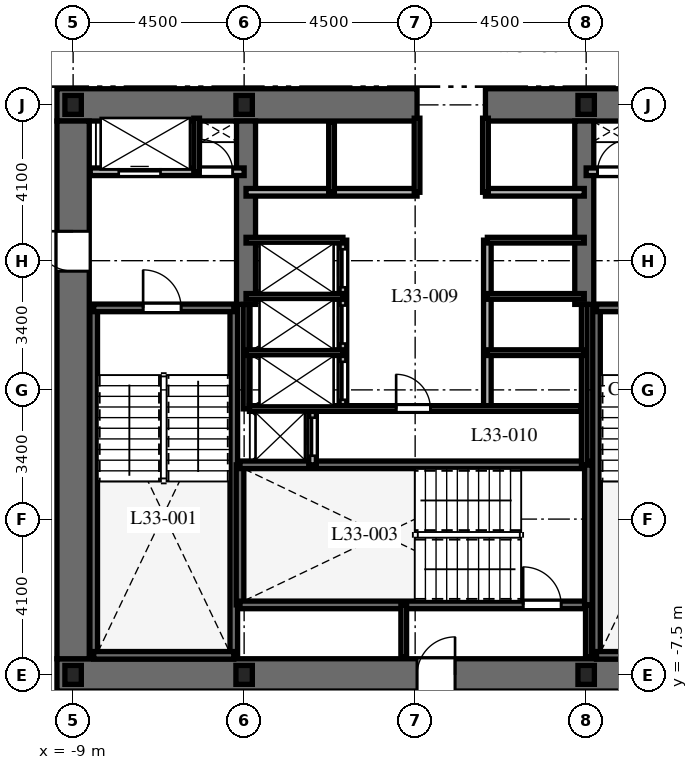
"""IFC4 building model, lengths in metres.
Left out: names, types, materials, properties, quantities, classifications, styles, units other than length and angle.
Written with IfcOpenShell. Run it as: python <this file> out.ifc"""

import sys

from ifc_helpers import new_model, si_unit, direction, frame, frame_2d, origin, origin_2d, place, context, subcontext, project, spatial, rectangle, i_section, extrude, element, fill, save


model = new_model("IFC4")
c1 = context("Model", 3, precision=1e-05, world=origin(), true_north=direction((0.0, 1.0)))
c2 = subcontext(c1, "Body", "Model", "MODEL_VIEW")
j1 = project(units=[si_unit("LENGTHUNIT", "METRE"), si_unit("PLANEANGLEUNIT", "RADIAN")], contexts=[c1])
p1 = place(None, origin())
s1 = spatial("IfcSite", under=j1, at=p1, CompositionType="ELEMENT")
p2 = place(p1, origin())
s2 = spatial("IfcBuilding", under=s1, at=p2, CompositionType="ELEMENT")
p3 = place(p2, frame((0.0, 0.0, 135.8)))
s3 = spatial("IfcBuildingStorey", under=s2, at=p3, CompositionType="ELEMENT", Elevation=135.8)
p4 = place(p3, frame((-9.425, -7.5, 0.0), z_axis=(0.0, 0.0, 1.0), x_axis=(1.0, 0.0, 0.0)))
e1 = element("IfcWall", 1, at=p4, inside=s3, PredefinedType="SHEAR", context=c2, shape_type="SweptSolid", body=[
    extrude(rectangle(XDim=18.85, YDim=0.85, at=frame_2d((9.425, 0.0))), origin(), (0.0, 0.0, 1.0), 3.7),
])
p5 = place(p4, frame((9.475, 0.0, 0.0)))
e2 = element("IfcOpeningElement", 2, at=p5, cuts=e1, PredefinedType="OPENING", context=c2, shape_type="SweptSolid", body=[
    extrude(rectangle(XDim=1.0, YDim=2.15, at=frame_2d((0.5, 1.075))), frame((0.0, 0.435, 0.0), z_axis=(0.0, -1.0, 0.0), x_axis=(1.0, 0.0, 0.0)), (0.0, 0.0, 1.0), 0.87),
])
p6 = place(p3, frame((-9.425, 7.5, 0.0), z_axis=(0.0, 0.0, 1.0), x_axis=(1.0, 0.0, 0.0)))
e3 = element("IfcWall", 3, at=p6, inside=s3, PredefinedType="SHEAR", context=c2, shape_type="SweptSolid", body=[
    extrude(rectangle(XDim=9.475, YDim=0.85, at=frame_2d((4.738, 0.0))), origin(), (0.0, 0.0, 1.0), 3.7),
])
p7 = place(p3, frame((1.85, 7.5, 0.0), z_axis=(0.0, 0.0, 1.0), x_axis=(1.0, 0.0, 0.0)))
e4 = element("IfcWall", 4, at=p7, inside=s3, PredefinedType="SHEAR", context=c2, shape_type="SweptSolid", body=[
    extrude(rectangle(XDim=7.575, YDim=0.85, at=frame_2d((3.788, 0.0))), origin(), (0.0, 0.0, 1.0), 3.7),
])
p8 = place(p3, frame((-9.0, -7.075, 0.0), z_axis=(0.0, 0.0, 1.0), x_axis=(0.0, 1.0, 0.0)))
e5 = element("IfcWall", 5, at=p8, inside=s3, PredefinedType="SHEAR", context=c2, shape_type="SweptSolid", body=[
    extrude(rectangle(XDim=14.15, YDim=0.85, at=frame_2d((7.075, 0.0))), origin(), (0.0, 0.0, 1.0), 3.7),
])
p9 = place(p8, frame((10.2, 0.0, 0.0)))
e6 = element("IfcOpeningElement", 6, at=p9, cuts=e5, PredefinedType="OPENING", context=c2, shape_type="SweptSolid", body=[
    extrude(rectangle(XDim=1.05, YDim=2.15, at=frame_2d((0.525, 1.075))), frame((0.0, 0.435, 0.0), z_axis=(0.0, -1.0, 0.0), x_axis=(1.0, 0.0, 0.0)), (0.0, 0.0, 1.0), 0.87),
])
for number, where, z_axis, x_axis in (
    (7, (-4.45, 2.25, 0.0), (0.0, 0.0, 1.0), (0.0, 1.0, 0.0)),
    (8, (4.45, 2.25, 0.0), (0.0, 0.0, 1.0), (0.0, 1.0, 0.0)),
):
    element("IfcWall", number, at=place(p3, frame(where, z_axis=z_axis, x_axis=x_axis)), inside=s3, PredefinedType="SHEAR", context=c2, shape_type="SweptSolid", body=[
        extrude(rectangle(XDim=4.825, YDim=0.5, at=frame_2d((2.413, 0.0))), origin(), (0.0, 0.0, 1.0), 3.7),
    ])
for number, where, z_axis, x_axis in (
    (9, (-8.458, -6.985, 0.0), (0.0, 0.0, 1.0), (0.0, 1.0, 0.0)),
    (10, (-4.772, -6.985, 0.0), (0.0, 0.0, 1.0), (0.0, 1.0, 0.0)),
):
    element("IfcWall", number, at=place(p3, frame(where, z_axis=z_axis, x_axis=x_axis)), inside=s3, PredefinedType="SHEAR", context=c2, shape_type="SweptSolid", body=[
        extrude(rectangle(XDim=9.143, YDim=0.2, at=frame_2d((4.572, 0.0))), origin(), (0.0, 0.0, 1.0), 3.7),
    ])
p10 = place(p3, frame((-8.458, -6.985, 0.0), z_axis=(0.0, 0.0, 1.0), x_axis=(1.0, 0.0, 0.0)))
e11 = element("IfcWall", 11, at=p10, inside=s3, PredefinedType="SHEAR", context=c2, shape_type="SweptSolid", body=[
    extrude(rectangle(XDim=3.686, YDim=0.2, at=frame_2d((1.843, 0.0))), origin(), (0.0, 0.0, 1.0), 3.7),
])
p11 = place(p3, frame((-8.458, 2.158, 0.0), z_axis=(0.0, 0.0, 1.0), x_axis=(1.0, 0.0, 0.0)))
e12 = element("IfcWall", 12, at=p11, inside=s3, PredefinedType="SHEAR", context=c2, shape_type="SweptSolid", body=[
    extrude(rectangle(XDim=3.686, YDim=0.2, at=frame_2d((1.843, 0.0))), origin(), (0.0, 0.0, 1.0), 3.7),
])
p12 = place(p11, frame((1.3, 0.0, 0.0)))
e13 = element("IfcOpeningElement", 13, at=p12, cuts=e12, PredefinedType="OPENING", context=c2, shape_type="SweptSolid", body=[
    extrude(rectangle(XDim=1.0, YDim=2.15, at=frame_2d((0.5, 1.075))), frame((0.0, 0.11, 0.0), z_axis=(0.0, -1.0, 0.0), x_axis=(1.0, 0.0, 0.0)), (0.0, 0.0, 1.0), 0.22),
])
p13 = place(p3, frame((4.772, -6.985, 0.0), z_axis=(0.0, 0.0, 1.0), x_axis=(0.0, 1.0, 0.0)))
e14 = element("IfcWall", 14, at=p13, inside=s3, PredefinedType="SHEAR", context=c2, shape_type="SweptSolid", body=[
    extrude(rectangle(XDim=9.143, YDim=0.2, at=frame_2d((4.572, 0.0))), origin(), (0.0, 0.0, 1.0), 3.7),
])
p14 = place(p3, frame((4.772, -6.985, 0.0), z_axis=(0.0, 0.0, 1.0), x_axis=(1.0, 0.0, 0.0)))
e15 = element("IfcWall", 15, at=p14, inside=s3, PredefinedType="SHEAR", context=c2, shape_type="SweptSolid", body=[
    extrude(rectangle(XDim=3.686, YDim=0.2, at=frame_2d((1.843, 0.0))), origin(), (0.0, 0.0, 1.0), 3.7),
])
p15 = place(p3, frame((4.772, 2.158, 0.0), z_axis=(0.0, 0.0, 1.0), x_axis=(1.0, 0.0, 0.0)))
e16 = element("IfcWall", 16, at=p15, inside=s3, PredefinedType="SHEAR", context=c2, shape_type="SweptSolid", body=[
    extrude(rectangle(XDim=3.686, YDim=0.2, at=frame_2d((1.843, 0.0))), origin(), (0.0, 0.0, 1.0), 3.7),
])
p16 = place(p15, frame((1.35, 0.0, 0.0)))
e17 = element("IfcOpeningElement", 17, at=p16, cuts=e16, PredefinedType="OPENING", context=c2, shape_type="SweptSolid", body=[
    extrude(rectangle(XDim=1.0, YDim=2.15, at=frame_2d((0.5, 1.075))), frame((0.0, 0.11, 0.0), z_axis=(0.0, -1.0, 0.0), x_axis=(1.0, 0.0, 0.0)), (0.0, 0.0, 1.0), 0.22),
])
p17 = place(p3, frame((-4.608, -5.658, 0.0), z_axis=(0.0, 0.0, 1.0), x_axis=(0.0, 1.0, 0.0)))
e18 = element("IfcWall", 18, at=p17, inside=s3, PredefinedType="SHEAR", context=c2, shape_type="SweptSolid", body=[
    extrude(rectangle(XDim=3.686, YDim=0.2, at=frame_2d((1.843, 0.0))), origin(), (0.0, 0.0, 1.0), 3.7),
])
p18 = place(p3, frame((-4.608, -5.658, 0.0), z_axis=(0.0, 0.0, 1.0), x_axis=(1.0, 0.0, 0.0)))
e19 = element("IfcWall", 19, at=p18, inside=s3, PredefinedType="SHEAR", context=c2, shape_type="SweptSolid", body=[
    extrude(rectangle(XDim=9.166, YDim=0.2, at=frame_2d((4.583, 0.0))), origin(), (0.0, 0.0, 1.0), 3.7),
])
p19 = place(p18, frame((7.45, 0.0, 0.0)))
e20 = element("IfcOpeningElement", 20, at=p19, cuts=e19, PredefinedType="OPENING", context=c2, shape_type="SweptSolid", body=[
    extrude(rectangle(XDim=1.0, YDim=2.15, at=frame_2d((0.5, 1.075))), frame((0.0, 0.11, 0.0), z_axis=(0.0, -1.0, 0.0), x_axis=(1.0, 0.0, 0.0)), (0.0, 0.0, 1.0), 0.22),
])
p20 = place(p3, frame((-4.608, -1.972, 0.0), z_axis=(0.0, 0.0, 1.0), x_axis=(1.0, 0.0, 0.0)))
e21 = element("IfcWall", 21, at=p20, inside=s3, PredefinedType="SHEAR", context=c2, shape_type="SweptSolid", body=[
    extrude(rectangle(XDim=9.166, YDim=0.2, at=frame_2d((4.583, 0.0))), origin(), (0.0, 0.0, 1.0), 3.7),
])
p21 = place(p3, frame((4.558, -5.658, 0.0), z_axis=(0.0, 0.0, 1.0), x_axis=(0.0, 1.0, 0.0)))
e22 = element("IfcWall", 22, at=p21, inside=s3, PredefinedType="SHEAR", context=c2, shape_type="SweptSolid", body=[
    extrude(rectangle(XDim=3.686, YDim=0.2, at=frame_2d((1.843, 0.0))), origin(), (0.0, 0.0, 1.0), 3.7),
])
for number, where, z_axis, x_axis in (
    (23, (-9.0, -7.5, 0.0), (0.0, 0.0, 1.0), (1.0, 0.0, 0.0)),
    (24, (-4.5, -7.5, 0.0), (0.0, 0.0, 1.0), (1.0, 0.0, 0.0)),
    (25, (4.5, -7.5, 0.0), (0.0, 0.0, 1.0), (1.0, 0.0, 0.0)),
    (26, (4.5, 7.5, 0.0), (0.0, 0.0, 1.0), (1.0, 0.0, 0.0)),
    (27, (-4.5, 7.5, 0.0), (0.0, 0.0, 1.0), (1.0, 0.0, 0.0)),
    (28, (-9.0, 7.5, 0.0), (0.0, 0.0, 1.0), (1.0, 0.0, 0.0)),
):
    element("IfcColumn", number, at=place(p3, frame(where, z_axis=z_axis, x_axis=x_axis)), inside=s3, PredefinedType="COLUMN", context=c2, shape_type="SweptSolid", body=[
        extrude(i_section(OverallWidth=0.432, OverallDepth=0.498, WebThickness=0.056, FlangeThickness=0.089, at=origin_2d()), origin(), (0.0, 0.0, 1.0), 3.7),
    ])
for number, where, z_axis, x_axis in (
    (29, (-0.3, -7.02, 0.0), (0.0, 0.0, 1.0), (0.0, 1.0, 0.0)),
    (30, (4.558, -7.02, 0.0), (0.0, 0.0, 1.0), (0.0, 1.0, 0.0)),
):
    element("IfcWall", number, at=place(p3, frame(where, z_axis=z_axis, x_axis=x_axis)), inside=s3, PredefinedType="PARTITIONING", context=c2, shape_type="SweptSolid", body=[
        extrude(rectangle(XDim=1.362, YDim=0.15, at=frame_2d((0.681, 0.0))), origin(), (0.0, 0.0, 1.0), 3.38),
    ])
p22 = place(p3, frame((-8.55, 5.74, 0.0), z_axis=(0.0, 0.0, 1.0), x_axis=(1.0, 0.0, 0.0)))
e31 = element("IfcWall", 31, at=p22, inside=s3, PredefinedType="PARTITIONING", context=c2, shape_type="SweptSolid", body=[
    extrude(rectangle(XDim=4.05, YDim=0.2, at=frame_2d((2.025, 0.0))), origin(), (0.0, 0.0, 1.0), 3.38),
])
p23 = place(p22, frame((0.75, 0.0, 0.0)))
e32 = element("IfcOpeningElement", 32, at=p23, cuts=e31, PredefinedType="OPENING", context=c2, shape_type="SweptSolid", body=[
    extrude(rectangle(XDim=1.1, YDim=2.2, at=frame_2d((0.55, 1.1))), frame((0.0, 0.11, 0.0), z_axis=(0.0, -1.0, 0.0), x_axis=(1.0, 0.0, 0.0)), (0.0, 0.0, 1.0), 0.22),
])
p24 = place(p22, frame((2.9, 0.0, 0.0)))
e33 = element("IfcOpeningElement", 33, at=p24, cuts=e31, PredefinedType="OPENING", context=c2, shape_type="SweptSolid", body=[
    extrude(rectangle(XDim=0.85, YDim=2.03, at=frame_2d((0.425, 1.015))), frame((0.0, 0.11, 0.0), z_axis=(0.0, -1.0, 0.0), x_axis=(1.0, 0.0, 0.0)), (0.0, 0.0, 1.0), 0.22),
])
p25 = place(p3, frame((-5.75, 5.74, 0.0), z_axis=(0.0, 0.0, 1.0), x_axis=(0.0, 1.0, 0.0)))
e34 = element("IfcWall", 34, at=p25, inside=s3, PredefinedType="PARTITIONING", context=c2, shape_type="SweptSolid", body=[
    extrude(rectangle(XDim=1.41, YDim=0.15, at=frame_2d((0.705, 0.0))), origin(), (0.0, 0.0, 1.0), 3.38),
])
p26 = place(p3, frame((4.5, 5.74, 0.0), z_axis=(0.0, 0.0, 1.0), x_axis=(1.0, 0.0, 0.0)))
e35 = element("IfcWall", 35, at=p26, inside=s3, PredefinedType="PARTITIONING", context=c2, shape_type="SweptSolid", body=[
    extrude(rectangle(XDim=4.05, YDim=0.2, at=frame_2d((2.025, 0.0))), origin(), (0.0, 0.0, 1.0), 3.38),
])
p27 = place(p26, frame((0.3, 0.0, 0.0)))
e36 = element("IfcOpeningElement", 36, at=p27, cuts=e35, PredefinedType="OPENING", context=c2, shape_type="SweptSolid", body=[
    extrude(rectangle(XDim=0.85, YDim=2.03, at=frame_2d((0.425, 1.015))), frame((0.0, 0.11, 0.0), z_axis=(0.0, -1.0, 0.0), x_axis=(1.0, 0.0, 0.0)), (0.0, 0.0, 1.0), 0.22),
])
p28 = place(p26, frame((2.15, 0.0, 0.0)))
e37 = element("IfcOpeningElement", 37, at=p28, cuts=e35, PredefinedType="OPENING", context=c2, shape_type="SweptSolid", body=[
    extrude(rectangle(XDim=1.1, YDim=2.2, at=frame_2d((0.55, 1.1))), frame((0.0, 0.11, 0.0), z_axis=(0.0, -1.0, 0.0), x_axis=(1.0, 0.0, 0.0)), (0.0, 0.0, 1.0), 0.22),
])
p29 = place(p3, frame((-2.7, -1.972, 0.0), z_axis=(0.0, 0.0, 1.0), x_axis=(0.0, 1.0, 0.0)))
e38 = element("IfcWall", 38, at=p29, inside=s3, PredefinedType="PARTITIONING", context=c2, shape_type="SweptSolid", body=[
    extrude(rectangle(XDim=1.472, YDim=0.2, at=frame_2d((0.736, 0.0))), origin(), (0.0, 0.0, 1.0), 3.38),
])
p30 = place(p29, frame((0.24, 0.0, 0.0)))
e39 = element("IfcOpeningElement", 39, at=p30, cuts=e38, PredefinedType="OPENING", context=c2, shape_type="SweptSolid", body=[
    extrude(rectangle(XDim=1.0, YDim=2.2, at=frame_2d((0.5, 1.1))), frame((0.0, 0.11, 0.0), z_axis=(0.0, -1.0, 0.0), x_axis=(1.0, 0.0, 0.0)), (0.0, 0.0, 1.0), 0.22),
])
p31 = place(p3, frame((-4.45, 5.2, 0.0), z_axis=(0.0, 0.0, 1.0), x_axis=(1.0, 0.0, 0.0)))
e40 = element("IfcWall", 40, at=p31, inside=s3, PredefinedType="PARTITIONING", context=c2, shape_type="SweptSolid", body=[
    extrude(rectangle(XDim=4.5, YDim=0.2, at=frame_2d((2.25, 0.0))), origin(), (0.0, 0.0, 1.0), 3.38),
])
p32 = place(p3, frame((1.85, 5.2, 0.0), z_axis=(0.0, 0.0, 1.0), x_axis=(1.0, 0.0, 0.0)))
e41 = element("IfcWall", 41, at=p32, inside=s3, PredefinedType="PARTITIONING", context=c2, shape_type="SweptSolid", body=[
    extrude(rectangle(XDim=2.6, YDim=0.2, at=frame_2d((1.3, 0.0))), origin(), (0.0, 0.0, 1.0), 3.38),
])
p33 = place(p3, frame((-2.2, 5.2, 0.0), z_axis=(0.0, 0.0, 1.0), x_axis=(0.0, 1.0, 0.0)))
e42 = element("IfcWall", 42, at=p33, inside=s3, PredefinedType="PARTITIONING", context=c2, shape_type="SweptSolid", body=[
    extrude(rectangle(XDim=1.85, YDim=0.15, at=frame_2d((0.925, 0.0))), origin(), (0.0, 0.0, 1.0), 3.38),
])
for number, where, z_axis, x_axis in (
    (43, (0.05, 5.2, 0.0), (0.0, 0.0, 1.0), (0.0, 1.0, 0.0)),
    (44, (1.85, 5.2, 0.0), (0.0, 0.0, 1.0), (0.0, 1.0, 0.0)),
):
    element("IfcWall", number, at=place(p3, frame(where, z_axis=z_axis, x_axis=x_axis)), inside=s3, PredefinedType="PARTITIONING", context=c2, shape_type="SweptSolid", body=[
        extrude(rectangle(XDim=1.95, YDim=0.15, at=frame_2d((0.975, 0.0))), origin(), (0.0, 0.0, 1.0), 3.38),
    ])
p34 = place(p3, frame((-4.45, -0.5, 0.0), z_axis=(0.0, 0.0, 1.0), x_axis=(0.0, 1.0, 0.0)))
e45 = element("IfcWall", 45, at=p34, inside=s3, PredefinedType="PARTITIONING", context=c2, shape_type="SweptSolid", body=[
    extrude(rectangle(XDim=2.75, YDim=0.15, at=frame_2d((1.375, 0.0))), origin(), (0.0, 0.0, 1.0), 3.38),
])
p35 = place(p3, frame((4.45, -1.972, 0.0), z_axis=(0.0, 0.0, 1.0), x_axis=(0.0, 1.0, 0.0)))
e46 = element("IfcWall", 46, at=p35, inside=s3, PredefinedType="PARTITIONING", context=c2, shape_type="SweptSolid", body=[
    extrude(rectangle(XDim=4.222, YDim=0.15, at=frame_2d((2.111, 0.0))), origin(), (0.0, 0.0, 1.0), 3.38),
])
p36 = place(p3, frame((-1.9, -0.5, 0.0), z_axis=(0.0, 0.0, 1.0), x_axis=(0.0, 1.0, 0.0)))
e47 = element("IfcWall", 47, at=p36, inside=s3, PredefinedType="PARTITIONING", context=c2, shape_type="SweptSolid", body=[
    extrude(rectangle(XDim=4.44, YDim=0.2, at=frame_2d((2.22, 0.0))), origin(), (0.0, 0.0, 1.0), 3.38),
])
p37 = place(p36, frame((0.24, 0.0, 0.0)))
e48 = element("IfcOpeningElement", 48, at=p37, cuts=e47, PredefinedType="OPENING", context=c2, shape_type="SweptSolid", body=[
    extrude(rectangle(XDim=1.0, YDim=2.2, at=frame_2d((0.5, 1.1))), frame((0.0, 0.11, 0.0), z_axis=(0.0, -1.0, 0.0), x_axis=(1.0, 0.0, 0.0)), (0.0, 0.0, 1.0), 0.22),
])
p38 = place(p36, frame((1.72, 0.0, 0.0)))
e49 = element("IfcOpeningElement", 49, at=p38, cuts=e47, PredefinedType="OPENING", context=c2, shape_type="SweptSolid", body=[
    extrude(rectangle(XDim=1.0, YDim=2.2, at=frame_2d((0.5, 1.1))), frame((0.0, 0.11, 0.0), z_axis=(0.0, -1.0, 0.0), x_axis=(1.0, 0.0, 0.0)), (0.0, 0.0, 1.0), 0.22),
])
p39 = place(p36, frame((3.2, 0.0, 0.0)))
e50 = element("IfcOpeningElement", 50, at=p39, cuts=e47, PredefinedType="OPENING", context=c2, shape_type="SweptSolid", body=[
    extrude(rectangle(XDim=1.0, YDim=2.2, at=frame_2d((0.5, 1.1))), frame((0.0, 0.11, 0.0), z_axis=(0.0, -1.0, 0.0), x_axis=(1.0, 0.0, 0.0)), (0.0, 0.0, 1.0), 0.22),
])
for number, where, z_axis, x_axis in (
    (51, (-4.45, 3.94, 0.0), (0.0, 0.0, 1.0), (1.0, 0.0, 0.0)),
    (52, (-4.45, 0.98, 0.0), (0.0, 0.0, 1.0), (1.0, 0.0, 0.0)),
    (53, (-4.45, 2.46, 0.0), (0.0, 0.0, 1.0), (1.0, 0.0, 0.0)),
):
    element("IfcWall", number, at=place(p3, frame(where, z_axis=z_axis, x_axis=x_axis)), inside=s3, PredefinedType="PARTITIONING", context=c2, shape_type="SweptSolid", body=[
        extrude(rectangle(XDim=2.55, YDim=0.15, at=frame_2d((1.275, 0.0))), origin(), (0.0, 0.0, 1.0), 3.38),
    ])
p40 = place(p3, frame((1.9, -0.5, 0.0), z_axis=(0.0, 0.0, 1.0), x_axis=(0.0, 1.0, 0.0)))
e54 = element("IfcWall", 54, at=p40, inside=s3, PredefinedType="PARTITIONING", context=c2, shape_type="SweptSolid", body=[
    extrude(rectangle(XDim=4.44, YDim=0.2, at=frame_2d((2.22, 0.0))), origin(), (0.0, 0.0, 1.0), 3.38),
])
for number, where, z_axis, x_axis in (
    (55, (1.9, 3.94, 0.0), (0.0, 0.0, 1.0), (1.0, 0.0, 0.0)),
    (56, (1.9, 0.98, 0.0), (0.0, 0.0, 1.0), (1.0, 0.0, 0.0)),
    (57, (1.9, 2.46, 0.0), (0.0, 0.0, 1.0), (1.0, 0.0, 0.0)),
):
    element("IfcWall", number, at=place(p3, frame(where, z_axis=z_axis, x_axis=x_axis)), inside=s3, PredefinedType="PARTITIONING", context=c2, shape_type="SweptSolid", body=[
        extrude(rectangle(XDim=2.55, YDim=0.15, at=frame_2d((1.275, 0.0))), origin(), (0.0, 0.0, 1.0), 3.38),
    ])
p41 = place(p3, frame((-4.36, -0.49, 0.0), z_axis=(0.0, 0.0, 1.0), x_axis=(1.0, 0.0, 0.0)))
e58 = element("IfcWall", 58, at=p41, inside=s3, PredefinedType="PARTITIONING", context=c2, shape_type="SweptSolid", body=[
    extrude(rectangle(XDim=8.72, YDim=0.15, at=frame_2d((4.36, 0.0))), origin(), (0.0, 0.0, 1.0), 3.38),
])
p42 = place(p41, frame((3.86, 0.0, 0.0)))
e59 = element("IfcOpeningElement", 59, at=p42, cuts=e58, PredefinedType="OPENING", context=c2, shape_type="SweptSolid", body=[
    extrude(rectangle(XDim=0.9, YDim=2.03, at=frame_2d((0.45, 1.015))), frame((0.0, 0.085, 0.0), z_axis=(0.0, -1.0, 0.0), x_axis=(1.0, 0.0, 0.0)), (0.0, 0.0, 1.0), 0.17),
])
p43 = place(p12, origin())
e60 = element("IfcDoor", 60, at=p43, inside=s3, OperationType="SINGLE_SWING_LEFT", PredefinedType="DOOR", context=c2, shape_type="SweptSolid", body=[
    extrude(rectangle(XDim=1.0, YDim=2.15, at=frame_2d((0.5, 1.075))), frame((0.0, 0.025, 0.0), z_axis=(0.0, -1.0, 0.0), x_axis=(1.0, 0.0, 0.0)), (0.0, 0.0, 1.0), 0.05),
])
fill(e13, e60)
p44 = place(p19, origin())
e61 = element("IfcDoor", 61, at=p44, inside=s3, OperationType="SINGLE_SWING_LEFT", PredefinedType="DOOR", context=c2, shape_type="SweptSolid", body=[
    extrude(rectangle(XDim=1.0, YDim=2.15, at=frame_2d((0.5, 1.075))), frame((0.0, 0.025, 0.0), z_axis=(0.0, -1.0, 0.0), x_axis=(1.0, 0.0, 0.0)), (0.0, 0.0, 1.0), 0.05),
])
fill(e20, e61)
p45 = place(p5, origin())
e62 = element("IfcDoor", 62, at=p45, inside=s3, OperationType="SINGLE_SWING_RIGHT", PredefinedType="DOOR", context=c2, shape_type="SweptSolid", body=[
    extrude(rectangle(XDim=1.0, YDim=2.15, at=frame_2d((0.5, 1.075))), frame((0.0, 0.025, 0.0), z_axis=(0.0, -1.0, 0.0), x_axis=(1.0, 0.0, 0.0)), (0.0, 0.0, 1.0), 0.05),
])
fill(e2, e62)
p46 = place(p9, origin())
e63 = element("IfcDoor", 63, at=p46, inside=s3, OperationType="SINGLE_SWING_RIGHT", PredefinedType="DOOR", context=c2, shape_type="SweptSolid", body=[
    extrude(rectangle(XDim=1.05, YDim=2.15, at=frame_2d((0.525, 1.075))), frame((0.0, 0.025, 0.0), z_axis=(0.0, -1.0, 0.0), x_axis=(1.0, 0.0, 0.0)), (0.0, 0.0, 1.0), 0.05),
])
fill(e6, e63)
p47 = place(p23, origin())
e64 = element("IfcDoor", 64, at=p47, inside=s3, OperationType="SLIDING_TO_LEFT", PredefinedType="DOOR", context=c2, shape_type="SweptSolid", body=[
    extrude(rectangle(XDim=1.1, YDim=2.2, at=frame_2d((0.55, 1.1))), frame((0.0, 0.025, 0.0), z_axis=(0.0, -1.0, 0.0), x_axis=(1.0, 0.0, 0.0)), (0.0, 0.0, 1.0), 0.05),
])
fill(e32, e64)
p48 = place(p24, origin())
e65 = element("IfcDoor", 65, at=p48, inside=s3, OperationType="SINGLE_SWING_LEFT", PredefinedType="DOOR", context=c2, shape_type="SweptSolid", body=[
    extrude(rectangle(XDim=0.85, YDim=2.03, at=frame_2d((0.425, 1.015))), frame((0.0, 0.025, 0.0), z_axis=(0.0, -1.0, 0.0), x_axis=(1.0, 0.0, 0.0)), (0.0, 0.0, 1.0), 0.05),
])
fill(e33, e65)
p49 = place(p27, origin())
e66 = element("IfcDoor", 66, at=p49, inside=s3, OperationType="SINGLE_SWING_RIGHT", PredefinedType="DOOR", context=c2, shape_type="SweptSolid", body=[
    extrude(rectangle(XDim=0.85, YDim=2.03, at=frame_2d((0.425, 1.015))), frame((0.0, 0.025, 0.0), z_axis=(0.0, -1.0, 0.0), x_axis=(1.0, 0.0, 0.0)), (0.0, 0.0, 1.0), 0.05),
])
fill(e36, e66)
p50 = place(p30, origin())
e67 = element("IfcDoor", 67, at=p50, inside=s3, OperationType="SLIDING_TO_LEFT", PredefinedType="DOOR", context=c2, shape_type="SweptSolid", body=[
    extrude(rectangle(XDim=1.0, YDim=2.2, at=frame_2d((0.5, 1.1))), frame((0.0, 0.025, 0.0), z_axis=(0.0, -1.0, 0.0), x_axis=(1.0, 0.0, 0.0)), (0.0, 0.0, 1.0), 0.05),
])
fill(e39, e67)
p51 = place(p37, origin())
e68 = element("IfcDoor", 68, at=p51, inside=s3, OperationType="SLIDING_TO_LEFT", PredefinedType="DOOR", context=c2, shape_type="SweptSolid", body=[
    extrude(rectangle(XDim=1.0, YDim=2.2, at=frame_2d((0.5, 1.1))), frame((0.0, 0.025, 0.0), z_axis=(0.0, -1.0, 0.0), x_axis=(1.0, 0.0, 0.0)), (0.0, 0.0, 1.0), 0.05),
])
fill(e48, e68)
p52 = place(p38, origin())
e69 = element("IfcDoor", 69, at=p52, inside=s3, OperationType="SLIDING_TO_LEFT", PredefinedType="DOOR", context=c2, shape_type="SweptSolid", body=[
    extrude(rectangle(XDim=1.0, YDim=2.2, at=frame_2d((0.5, 1.1))), frame((0.0, 0.025, 0.0), z_axis=(0.0, -1.0, 0.0), x_axis=(1.0, 0.0, 0.0)), (0.0, 0.0, 1.0), 0.05),
])
fill(e49, e69)
p53 = place(p39, origin())
e70 = element("IfcDoor", 70, at=p53, inside=s3, OperationType="SLIDING_TO_LEFT", PredefinedType="DOOR", context=c2, shape_type="SweptSolid", body=[
    extrude(rectangle(XDim=1.0, YDim=2.2, at=frame_2d((0.5, 1.1))), frame((0.0, 0.025, 0.0), z_axis=(0.0, -1.0, 0.0), x_axis=(1.0, 0.0, 0.0)), (0.0, 0.0, 1.0), 0.05),
])
fill(e50, e70)
p54 = place(p42, origin())
e71 = element("IfcDoor", 71, at=p54, inside=s3, OperationType="SINGLE_SWING_LEFT", PredefinedType="DOOR", context=c2, shape_type="SweptSolid", body=[
    extrude(rectangle(XDim=0.9, YDim=2.03, at=frame_2d((0.45, 1.015))), frame((0.0, 0.025, 0.0), z_axis=(0.0, -1.0, 0.0), x_axis=(1.0, 0.0, 0.0)), (0.0, 0.0, 1.0), 0.05),
])
fill(e59, e71)
save(model, sys.argv[1])
